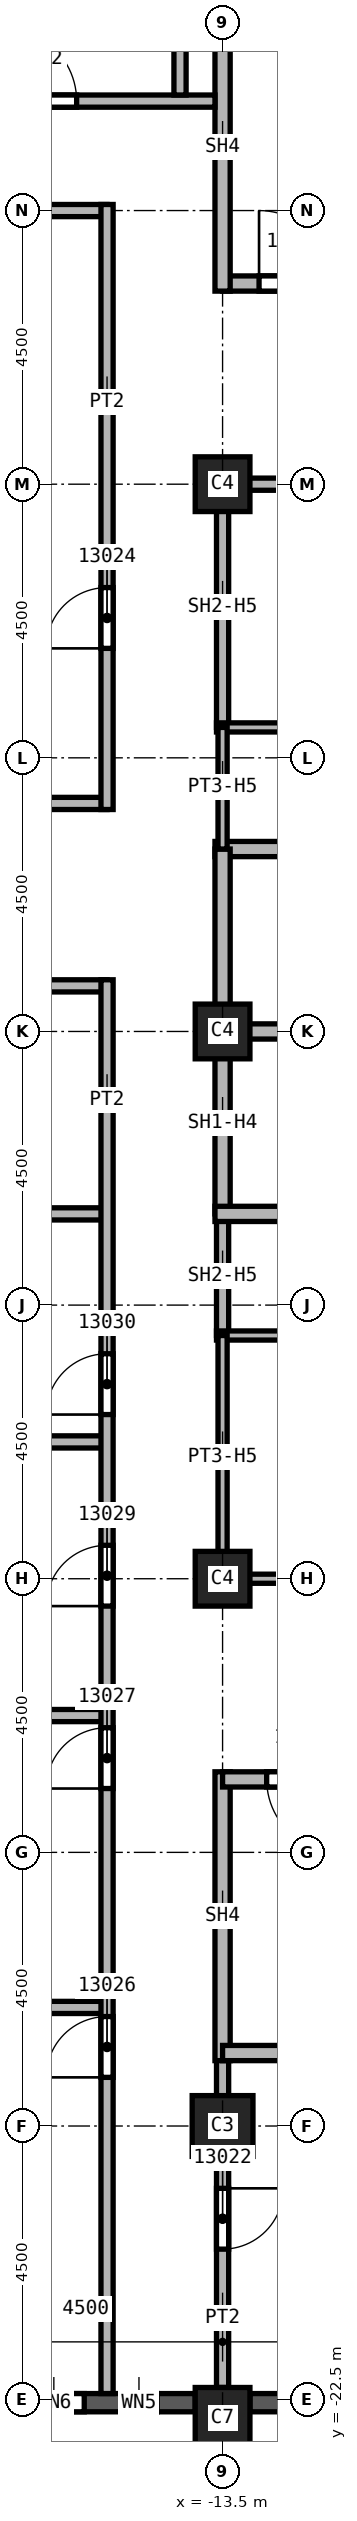
"""IFC4 building model, lengths in metres.
Left out: names, types, materials, properties, quantities, classifications, styles, units other than length and angle.
Written with IfcOpenShell. Run it as: python <this file> out.ifc"""

import sys

from ifc_helpers import new_model, si_unit, direction, frame, frame_2d, origin, origin_2d, place, context, subcontext, project, spatial, rectangle, extrude, element, fill, save


model = new_model("IFC4")
c1 = context("Model", 3, precision=1e-05, world=origin(), true_north=direction((0.0, 1.0)))
c2 = subcontext(c1, "Body", "Model", "MODEL_VIEW")
j1 = project(units=[si_unit("LENGTHUNIT", "METRE"), si_unit("PLANEANGLEUNIT", "RADIAN")], contexts=[c1])
p1 = place(None, origin())
s1 = spatial("IfcSite", under=j1, at=p1, CompositionType="ELEMENT")
p2 = place(p1, origin())
s2 = spatial("IfcBuilding", under=s1, at=p2, CompositionType="ELEMENT")
p3 = place(p2, frame((0.0, 0.0, 208.0)))
s3 = spatial("IfcBuildingStorey", under=s2, at=p3, CompositionType="ELEMENT", Elevation=208.0)
p4 = place(p3, frame((-13.5, -18.0, 0.0), z_axis=(0.0, 0.0, 1.0), x_axis=(1.0, 0.0, 0.0)))
e1 = element("IfcColumn", 1, at=p4, inside=s3, PredefinedType="COLUMN", context=c2, shape_type="SweptSolid", body=[
    extrude(rectangle(XDim=1.0, YDim=1.0, at=origin_2d()), origin(), (0.0, 0.0, 1.0), 3.72),
])
for number, where, z_axis, x_axis in (
    (2, (-13.5, 0.0, 0.0), (0.0, 0.0, 1.0), (1.0, 0.0, 0.0)),
    (3, (-13.5, 9.0, 0.0), (0.0, 0.0, 1.0), (1.0, 0.0, 0.0)),
    (4, (-13.5, -9.0, 0.0), (0.0, 0.0, 1.0), (1.0, 0.0, 0.0)),
):
    element("IfcColumn", number, at=place(p3, frame(where, z_axis=z_axis, x_axis=x_axis)), inside=s3, PredefinedType="COLUMN", context=c2, shape_type="SweptSolid", body=[
        extrude(rectangle(XDim=0.9, YDim=0.9, at=origin_2d()), origin(), (0.0, 0.0, 1.0), 3.72),
    ])
p5 = place(p3, frame((-13.5, -22.8, 0.0), z_axis=(0.0, 0.0, 1.0), x_axis=(1.0, 0.0, 0.0)))
e5 = element("IfcColumn", 5, at=p5, inside=s3, PredefinedType="COLUMN", context=c2, shape_type="SweptSolid", body=[
    extrude(rectangle(XDim=0.9, YDim=1.0, at=origin_2d()), origin(), (0.0, 0.0, 1.0), 3.72),
])
p6 = place(p3, frame((-17.55, -22.55, 0.0), z_axis=(0.0, 0.0, 1.0), x_axis=(1.0, 0.0, 0.0)))
e6 = element("IfcWall", 6, at=p6, inside=s3, PredefinedType="SOLIDWALL", context=c2, shape_type="SweptSolid", body=[
    extrude(rectangle(XDim=3.6, YDim=0.3, at=frame_2d((1.8, 0.0))), origin(), (0.0, 0.0, 1.0), 3.12),
])
p7 = place(p6, frame((0.775, 0.0, 0.8)))
e7 = element("IfcOpeningElement", 7, at=p7, cuts=e6, PredefinedType="OPENING", context=c2, shape_type="SweptSolid", body=[
    extrude(rectangle(XDim=1.0, YDim=1.95, at=frame_2d((0.5, 0.975))), frame((0.0, 0.15, 0.0), z_axis=(0.0, -1.0, 0.0), x_axis=(1.0, 0.0, 0.0)), (0.0, 0.0, 1.0), 0.3),
])
p8 = place(p6, frame((2.375, 0.0, 0.8)))
e8 = element("IfcOpeningElement", 8, at=p8, cuts=e6, PredefinedType="OPENING", context=c2, shape_type="SweptSolid", body=[
    extrude(rectangle(XDim=0.6, YDim=1.95, at=frame_2d((0.3, 0.975))), frame((0.0, 0.15, 0.0), z_axis=(0.0, -1.0, 0.0), x_axis=(1.0, 0.0, 0.0)), (0.0, 0.0, 1.0), 0.3),
])
p9 = place(p3, frame((-13.05, -22.55, 0.0), z_axis=(0.0, 0.0, 1.0), x_axis=(1.0, 0.0, 0.0)))
e9 = element("IfcWall", 9, at=p9, inside=s3, PredefinedType="SOLIDWALL", context=c2, shape_type="SweptSolid", body=[
    extrude(rectangle(XDim=3.6, YDim=0.3, at=frame_2d((1.8, 0.0))), origin(), (0.0, 0.0, 1.0), 3.12),
])
p10 = place(p9, frame((0.6, 0.0, 0.8)))
e10 = element("IfcOpeningElement", 10, at=p10, cuts=e9, PredefinedType="OPENING", context=c2, shape_type="SweptSolid", body=[
    extrude(rectangle(XDim=2.4, YDim=1.95, at=frame_2d((1.2, 0.975))), frame((0.0, 0.15, 0.0), z_axis=(0.0, -1.0, 0.0), x_axis=(1.0, 0.0, 0.0)), (0.0, 0.0, 1.0), 0.3),
])
p11 = place(p3, frame((-33.85, 3.75, 0.0), z_axis=(0.0, 0.0, 1.0), x_axis=(1.0, 0.0, 0.0)))
e11 = element("IfcWall", 11, at=p11, inside=s3, PredefinedType="PARTITIONING", context=c2, shape_type="SweptSolid", body=[
    extrude(rectangle(XDim=18.45, YDim=0.2, at=frame_2d((9.225, 0.0))), origin(), (0.0, 0.0, 1.0), 3.72),
])
for number, where, z_axis, x_axis in (
    (12, (-27.1, -11.25, 0.0), (0.0, 0.0, 1.0), (1.0, 0.0, 0.0)),
    (13, (-27.1, -6.75, 0.0), (0.0, 0.0, 1.0), (1.0, 0.0, 0.0)),
    (14, (-27.1, -3.0, 0.0), (0.0, 0.0, 1.0), (1.0, 0.0, 0.0)),
):
    element("IfcWall", number, at=place(p3, frame(where, z_axis=z_axis, x_axis=x_axis)), inside=s3, PredefinedType="PARTITIONING", context=c2, shape_type="SweptSolid", body=[
        extrude(rectangle(XDim=11.7, YDim=0.2, at=frame_2d((5.85, 0.0))), origin(), (0.0, 0.0, 1.0), 3.72),
    ])
p12 = place(p3, frame((-15.4, 0.75, 0.0), z_axis=(0.0, 0.0, 1.0), x_axis=(-1.0, 0.0, 0.0)))
e15 = element("IfcWall", 15, at=p12, inside=s3, PredefinedType="PARTITIONING", context=c2, shape_type="SweptSolid", body=[
    extrude(rectangle(XDim=18.45, YDim=0.2, at=frame_2d((9.225, 0.0))), origin(), (0.0, 0.0, 1.0), 3.72),
])
p13 = place(p12, frame((3.55, 0.0, 0.0)))
e16 = element("IfcOpeningElement", 16, at=p13, cuts=e15, PredefinedType="OPENING", context=c2, shape_type="SweptSolid", body=[
    extrude(rectangle(XDim=1.0, YDim=2.1, at=frame_2d((0.5, 1.05))), frame((0.0, 0.1, 0.0), z_axis=(0.0, -1.0, 0.0), x_axis=(1.0, 0.0, 0.0)), (0.0, 0.0, 1.0), 0.2),
])
p14 = place(p3, frame((-15.4, 13.5, 0.0), z_axis=(0.0, 0.0, 1.0), x_axis=(-1.0, 0.0, 0.0)))
e17 = element("IfcWall", 17, at=p14, inside=s3, PredefinedType="PARTITIONING", context=c2, shape_type="SweptSolid", body=[
    extrude(rectangle(XDim=6.6, YDim=0.2, at=frame_2d((3.3, 0.0))), origin(), (0.0, 0.0, 1.0), 3.72),
])
p15 = place(p3, frame((-20.0, -16.05, 0.0), z_axis=(0.0, 0.0, 1.0), x_axis=(1.0, 0.0, 0.0)))
e18 = element("IfcWall", 18, at=p15, inside=s3, PredefinedType="PARTITIONING", context=c2, shape_type="SweptSolid", body=[
    extrude(rectangle(XDim=4.6, YDim=0.2, at=frame_2d((2.3, 0.0))), origin(), (0.0, 0.0, 1.0), 3.72),
])
p16 = place(p3, frame((-15.4, -22.4, 0.0), z_axis=(0.0, 0.0, 1.0), x_axis=(0.0, 1.0, 0.0)))
e19 = element("IfcWall", 19, at=p16, inside=s3, PredefinedType="PARTITIONING", context=c2, shape_type="SweptSolid", body=[
    extrude(rectangle(XDim=23.25, YDim=0.2, at=frame_2d((11.625, 0.0))), origin(), (0.0, 0.0, 1.0), 3.72),
])
p17 = place(p16, frame((5.2, 0.0, 0.0)))
e20 = element("IfcOpeningElement", 20, at=p17, cuts=e19, PredefinedType="OPENING", context=c2, shape_type="SweptSolid", body=[
    extrude(rectangle(XDim=1.0, YDim=2.1, at=frame_2d((0.5, 1.05))), frame((0.0, 0.1, 0.0), z_axis=(0.0, -1.0, 0.0), x_axis=(1.0, 0.0, 0.0)), (0.0, 0.0, 1.0), 0.2),
])
p18 = place(p16, frame((9.95, 0.0, 0.0)))
e21 = element("IfcOpeningElement", 21, at=p18, cuts=e19, PredefinedType="OPENING", context=c2, shape_type="SweptSolid", body=[
    extrude(rectangle(XDim=1.0, YDim=2.1, at=frame_2d((0.5, 1.05))), frame((0.0, 0.1, 0.0), z_axis=(0.0, -1.0, 0.0), x_axis=(1.0, 0.0, 0.0)), (0.0, 0.0, 1.0), 0.2),
])
p19 = place(p16, frame((12.95, 0.0, 0.0)))
e22 = element("IfcOpeningElement", 22, at=p19, cuts=e19, PredefinedType="OPENING", context=c2, shape_type="SweptSolid", body=[
    extrude(rectangle(XDim=1.0, YDim=2.1, at=frame_2d((0.5, 1.05))), frame((0.0, 0.1, 0.0), z_axis=(0.0, -1.0, 0.0), x_axis=(1.0, 0.0, 0.0)), (0.0, 0.0, 1.0), 0.2),
])
p20 = place(p16, frame((16.1, 0.0, 0.0)))
e23 = element("IfcOpeningElement", 23, at=p20, cuts=e19, PredefinedType="OPENING", context=c2, shape_type="SweptSolid", body=[
    extrude(rectangle(XDim=1.0, YDim=2.1, at=frame_2d((0.5, 1.05))), frame((0.0, 0.1, 0.0), z_axis=(0.0, -1.0, 0.0), x_axis=(1.0, 0.0, 0.0)), (0.0, 0.0, 1.0), 0.2),
])
p21 = place(p3, frame((-15.4, 3.65, 0.0), z_axis=(0.0, 0.0, 1.0), x_axis=(0.0, 1.0, 0.0)))
e24 = element("IfcWall", 24, at=p21, inside=s3, PredefinedType="PARTITIONING", context=c2, shape_type="SweptSolid", body=[
    extrude(rectangle(XDim=9.95, YDim=0.2, at=frame_2d((4.975, 0.0))), origin(), (0.0, 0.0, 1.0), 3.72),
])
p22 = place(p21, frame((2.65, 0.0, 0.0)))
e25 = element("IfcOpeningElement", 25, at=p22, cuts=e24, PredefinedType="OPENING", context=c2, shape_type="SweptSolid", body=[
    extrude(rectangle(XDim=1.0, YDim=2.1, at=frame_2d((0.5, 1.05))), frame((0.0, 0.1, 0.0), z_axis=(0.0, -1.0, 0.0), x_axis=(1.0, 0.0, 0.0)), (0.0, 0.0, 1.0), 0.2),
])
p23 = place(p3, frame((-13.5, -16.675, 0.0), z_axis=(0.0, 0.0, 1.0), x_axis=(0.0, -1.0, 0.0)))
e26 = element("IfcWall", 26, at=p23, inside=s3, PredefinedType="PARTITIONING", context=c2, shape_type="SweptSolid", body=[
    extrude(rectangle(XDim=5.625, YDim=0.2, at=frame_2d((2.812, 0.0))), origin(), (0.0, 0.0, 1.0), 3.72),
])
p24 = place(p23, frame((2.35, 0.0, 0.0)))
e27 = element("IfcOpeningElement", 27, at=p24, cuts=e26, PredefinedType="OPENING", context=c2, shape_type="SweptSolid", body=[
    extrude(rectangle(XDim=1.0, YDim=2.1, at=frame_2d((0.5, 1.05))), frame((0.0, 0.1, 0.0), z_axis=(0.0, -1.0, 0.0), x_axis=(1.0, 0.0, 0.0)), (0.0, 0.0, 1.0), 0.2),
])
p25 = place(p3, frame((-13.5, -5.0, 0.0), z_axis=(0.0, 0.0, 1.0), x_axis=(0.0, 1.0, 0.0)))
e28 = element("IfcWall", 28, at=p25, inside=s3, PredefinedType="SOLIDWALL", context=c2, shape_type="SweptSolid", body=[
    extrude(rectangle(XDim=2.0, YDim=0.2, at=frame_2d((1.0, 0.0))), origin(), (0.0, 0.0, 1.0), 2.958),
])
p26 = place(p3, frame((-13.5, 5.0, 0.0), z_axis=(0.0, 0.0, 1.0), x_axis=(0.0, 1.0, 0.0)))
e29 = element("IfcWall", 29, at=p26, inside=s3, PredefinedType="SOLIDWALL", context=c2, shape_type="SweptSolid", body=[
    extrude(rectangle(XDim=4.1, YDim=0.2, at=frame_2d((2.05, 0.0))), origin(), (0.0, 0.0, 1.0), 2.958),
])
p27 = place(p3, frame((-13.5, 9.0, 0.0), z_axis=(0.0, 0.0, 1.0), x_axis=(1.0, 0.0, 0.0)))
e30 = element("IfcWall", 30, at=p27, inside=s3, PredefinedType="SOLIDWALL", context=c2, shape_type="SweptSolid", body=[
    extrude(rectangle(XDim=3.0, YDim=0.2, at=frame_2d((1.5, 0.0))), origin(), (0.0, 0.0, 1.0), 2.958),
])
p28 = place(p3, frame((-13.625, 0.0, 0.0), z_axis=(0.0, 0.0, 1.0), x_axis=(1.0, 0.0, 0.0)))
e31 = element("IfcWall", 31, at=p28, inside=s3, PredefinedType="SOLIDWALL", context=c2, shape_type="SweptSolid", body=[
    extrude(rectangle(XDim=3.125, YDim=0.25, at=frame_2d((1.562, 0.0))), origin(), (0.0, 0.0, 1.0), 3.72),
])
p29 = place(p3, frame((-13.625, 3.0, 0.0), z_axis=(0.0, 0.0, 1.0), x_axis=(1.0, 0.0, 0.0)))
e32 = element("IfcWall", 32, at=p29, inside=s3, PredefinedType="SOLIDWALL", context=c2, shape_type="SweptSolid", body=[
    extrude(rectangle(XDim=9.25, YDim=0.25, at=frame_2d((4.625, 0.0))), origin(), (0.0, 0.0, 1.0), 3.72),
])
p30 = place(p29, frame((3.25, 0.0, 0.0)))
e33 = element("IfcOpeningElement", 33, at=p30, cuts=e32, PredefinedType="OPENING", context=c2, shape_type="SweptSolid", body=[
    extrude(rectangle(XDim=1.1, YDim=2.1, at=frame_2d((0.55, 1.05))), frame((0.0, 0.125, 0.0), z_axis=(0.0, -1.0, 0.0), x_axis=(1.0, 0.0, 0.0)), (0.0, 0.0, 1.0), 0.25),
])
p31 = place(p3, frame((-13.5, -3.0, 0.0), z_axis=(0.0, 0.0, 1.0), x_axis=(0.0, 1.0, 0.0)))
e34 = element("IfcWall", 34, at=p31, inside=s3, PredefinedType="SOLIDWALL", context=c2, shape_type="SweptSolid", body=[
    extrude(rectangle(XDim=6.0, YDim=0.25, at=frame_2d((3.0, 0.0))), origin(), (0.0, 0.0, 1.0), 2.958),
])
p32 = place(p3, frame((-13.625, -3.0, 0.0), z_axis=(0.0, 0.0, 1.0), x_axis=(1.0, 0.0, 0.0)))
e35 = element("IfcWall", 35, at=p32, inside=s3, PredefinedType="SOLIDWALL", context=c2, shape_type="SweptSolid", body=[
    extrude(rectangle(XDim=6.125, YDim=0.25, at=frame_2d((3.062, 0.0))), origin(), (0.0, 0.0, 1.0), 3.72),
])
p33 = place(p32, frame((3.25, 0.0, 0.0)))
e36 = element("IfcOpeningElement", 36, at=p33, cuts=e35, PredefinedType="OPENING", context=c2, shape_type="SweptSolid", body=[
    extrude(rectangle(XDim=1.1, YDim=2.1, at=frame_2d((0.55, 1.05))), frame((0.0, 0.125, 0.0), z_axis=(0.0, -1.0, 0.0), x_axis=(1.0, 0.0, 0.0)), (0.0, 0.0, 1.0), 0.25),
])
p34 = place(p3, frame((-13.5, -12.175, 0.0), z_axis=(0.0, 0.0, 1.0), x_axis=(0.0, -1.0, 0.0)))
e37 = element("IfcWall", 37, at=p34, inside=s3, PredefinedType="SOLIDWALL", context=c2, shape_type="SweptSolid", body=[
    extrude(rectangle(XDim=4.75, YDim=0.25, at=frame_2d((2.375, 0.0))), origin(), (0.0, 0.0, 1.0), 3.72),
])
p35 = place(p3, frame((-13.5, 12.3, 0.0), z_axis=(0.0, 0.0, 1.0), x_axis=(1.0, 0.0, 0.0)))
e38 = element("IfcWall", 38, at=p35, inside=s3, PredefinedType="SOLIDWALL", context=c2, shape_type="SweptSolid", body=[
    extrude(rectangle(XDim=9.125, YDim=0.25, at=frame_2d((4.562, 0.0))), origin(), (0.0, 0.0, 1.0), 3.72),
])
p36 = place(p35, frame((0.6, 0.0, 0.0)))
e39 = element("IfcOpeningElement", 39, at=p36, cuts=e38, PredefinedType="OPENING", context=c2, shape_type="SweptSolid", body=[
    extrude(rectangle(XDim=1.2, YDim=2.1, at=frame_2d((0.6, 1.05))), frame((0.0, 0.125, 0.0), z_axis=(0.0, -1.0, 0.0), x_axis=(1.0, 0.0, 0.0)), (0.0, 0.0, 1.0), 0.25),
])
p37 = place(p3, frame((-13.5, 16.78, 0.0), z_axis=(0.0, 0.0, 1.0), x_axis=(0.0, -1.0, 0.0)))
e40 = element("IfcWall", 40, at=p37, inside=s3, PredefinedType="SOLIDWALL", context=c2, shape_type="SweptSolid", body=[
    extrude(rectangle(XDim=4.605, YDim=0.25, at=frame_2d((2.302, 0.0))), origin(), (0.0, 0.0, 1.0), 3.72),
])
p38 = place(p3, frame((-4.5, -16.8, 0.0), z_axis=(0.0, 0.0, 1.0), x_axis=(-1.0, 0.0, 0.0)))
e41 = element("IfcWall", 41, at=p38, inside=s3, PredefinedType="SOLIDWALL", context=c2, shape_type="SweptSolid", body=[
    extrude(rectangle(XDim=9.0, YDim=0.25, at=frame_2d((4.5, 0.0))), origin(), (0.0, 0.0, 1.0), 3.72),
])
p39 = place(p3, frame((-4.375, -12.3, 0.0), z_axis=(0.0, 0.0, 1.0), x_axis=(-1.0, 0.0, 0.0)))
e42 = element("IfcWall", 42, at=p39, inside=s3, PredefinedType="SOLIDWALL", context=c2, shape_type="SweptSolid", body=[
    extrude(rectangle(XDim=9.125, YDim=0.25, at=frame_2d((4.562, 0.0))), origin(), (0.0, 0.0, 1.0), 3.72),
])
p40 = place(p39, frame((7.2, 0.0, 0.0)))
e43 = element("IfcOpeningElement", 43, at=p40, cuts=e42, PredefinedType="OPENING", context=c2, shape_type="SweptSolid", body=[
    extrude(rectangle(XDim=1.2, YDim=2.1, at=frame_2d((0.6, 1.05))), frame((0.0, 0.125, 0.0), z_axis=(0.0, -1.0, 0.0), x_axis=(1.0, 0.0, 0.0)), (0.0, 0.0, 1.0), 0.25),
])
for number, where, z_axis, x_axis in (
    (44, (-13.6, -5.0, 0.0), (0.0, 0.0, 1.0), (1.0, 0.0, 0.0)),
    (45, (-13.6, 5.0, 0.0), (0.0, 0.0, 1.0), (1.0, 0.0, 0.0)),
):
    element("IfcWall", number, at=place(p3, frame(where, z_axis=z_axis, x_axis=x_axis)), inside=s3, PredefinedType="PARTITIONING", context=c2, shape_type="SweptSolid", body=[
        extrude(rectangle(XDim=3.1, YDim=0.15, at=frame_2d((1.55, 0.0))), origin(), (0.0, 0.0, 1.0), 3.72),
    ])
p41 = place(p3, frame((-13.5, -9.075, 0.0), z_axis=(0.0, 0.0, 1.0), x_axis=(0.0, 1.0, 0.0)))
e46 = element("IfcWall", 46, at=p41, inside=s3, PredefinedType="PARTITIONING", context=c2, shape_type="SweptSolid", body=[
    extrude(rectangle(XDim=4.075, YDim=0.15, at=frame_2d((2.038, 0.0))), origin(), (0.0, 0.0, 1.0), 2.958),
])
p42 = place(p3, frame((-13.5, 3.0, 0.0), z_axis=(0.0, 0.0, 1.0), x_axis=(0.0, 1.0, 0.0)))
e47 = element("IfcWall", 47, at=p42, inside=s3, PredefinedType="PARTITIONING", context=c2, shape_type="SweptSolid", body=[
    extrude(rectangle(XDim=2.0, YDim=0.15, at=frame_2d((1.0, 0.0))), origin(), (0.0, 0.0, 1.0), 2.958),
])
p43 = place(p3, frame((-10.5, -9.0, 0.0), z_axis=(0.0, 0.0, 1.0), x_axis=(-1.0, 0.0, 0.0)))
e48 = element("IfcWall", 48, at=p43, inside=s3, PredefinedType="PARTITIONING", context=c2, shape_type="SweptSolid", body=[
    extrude(rectangle(XDim=3.0, YDim=0.15, at=frame_2d((1.5, 0.0))), origin(), (0.0, 0.0, 1.0), 2.958),
])
p44 = place(p3, frame((-21.9, 15.3, 0.0), z_axis=(0.0, 0.0, 1.0), x_axis=(1.0, 0.0, 0.0)))
e49 = element("IfcWall", 49, at=p44, inside=s3, PredefinedType="SOLIDWALL", context=c2, shape_type="SweptSolid", body=[
    extrude(rectangle(XDim=8.275, YDim=0.2, at=frame_2d((4.137, 0.0))), origin(), (0.0, 0.0, 1.0), 3.72),
])
p45 = place(p44, frame((4.8, 0.0, 0.0)))
e50 = element("IfcOpeningElement", 50, at=p45, cuts=e49, PredefinedType="OPENING", context=c2, shape_type="SweptSolid", body=[
    extrude(rectangle(XDim=1.2, YDim=2.1, at=frame_2d((0.6, 1.05))), frame((0.0, 0.1, 0.0), z_axis=(0.0, -1.0, 0.0), x_axis=(1.0, 0.0, 0.0)), (0.0, 0.0, 1.0), 0.2),
])
p46 = place(p3, frame((-14.2, 15.4, 0.0), z_axis=(0.0, 0.0, 1.0), x_axis=(0.0, 1.0, 0.0)))
e51 = element("IfcWall", 51, at=p46, inside=s3, PredefinedType="SOLIDWALL", context=c2, shape_type="SweptSolid", body=[
    extrude(rectangle(XDim=5.9, YDim=0.2, at=frame_2d((2.95, 0.0))), origin(), (0.0, 0.0, 1.0), 3.72),
])
p47 = place(p36, origin())
e52 = element("IfcDoor", 52, at=p47, inside=s3, OperationType="SINGLE_SWING_RIGHT", PredefinedType="DOOR", context=c2, shape_type="SweptSolid", body=[
    extrude(rectangle(XDim=1.2, YDim=2.1, at=frame_2d((0.6, 1.05))), frame((0.0, 0.025, 0.0), z_axis=(0.0, -1.0, 0.0), x_axis=(1.0, 0.0, 0.0)), (0.0, 0.0, 1.0), 0.05),
])
fill(e39, e52)
p48 = place(p40, origin())
e53 = element("IfcDoor", 53, at=p48, inside=s3, OperationType="SINGLE_SWING_LEFT", PredefinedType="DOOR", context=c2, shape_type="SweptSolid", body=[
    extrude(rectangle(XDim=1.2, YDim=2.1, at=frame_2d((0.6, 1.05))), frame((0.0, 0.025, 0.0), z_axis=(0.0, -1.0, 0.0), x_axis=(1.0, 0.0, 0.0)), (0.0, 0.0, 1.0), 0.05),
])
fill(e43, e53)
p49 = place(p24, origin())
e54 = element("IfcDoor", 54, at=p49, inside=s3, OperationType="SINGLE_SWING_LEFT", PredefinedType="DOOR", context=c2, shape_type="SweptSolid", body=[
    extrude(rectangle(XDim=1.0, YDim=2.1, at=frame_2d((0.5, 1.05))), frame((0.0, 0.025, 0.0), z_axis=(0.0, -1.0, 0.0), x_axis=(1.0, 0.0, 0.0)), (0.0, 0.0, 1.0), 0.05),
])
fill(e27, e54)
p50 = place(p22, origin())
e55 = element("IfcDoor", 55, at=p50, inside=s3, OperationType="SINGLE_SWING_LEFT", PredefinedType="DOOR", context=c2, shape_type="SweptSolid", body=[
    extrude(rectangle(XDim=1.0, YDim=2.1, at=frame_2d((0.5, 1.05))), frame((0.0, 0.025, 0.0), z_axis=(0.0, -1.0, 0.0), x_axis=(1.0, 0.0, 0.0)), (0.0, 0.0, 1.0), 0.05),
])
fill(e25, e55)
p51 = place(p17, origin())
e56 = element("IfcDoor", 56, at=p51, inside=s3, OperationType="SINGLE_SWING_LEFT", PredefinedType="DOOR", context=c2, shape_type="SweptSolid", body=[
    extrude(rectangle(XDim=1.0, YDim=2.1, at=frame_2d((0.5, 1.05))), frame((0.0, 0.025, 0.0), z_axis=(0.0, -1.0, 0.0), x_axis=(1.0, 0.0, 0.0)), (0.0, 0.0, 1.0), 0.05),
])
fill(e20, e56)
p52 = place(p18, origin())
e57 = element("IfcDoor", 57, at=p52, inside=s3, OperationType="SINGLE_SWING_RIGHT", PredefinedType="DOOR", context=c2, shape_type="SweptSolid", body=[
    extrude(rectangle(XDim=1.0, YDim=2.1, at=frame_2d((0.5, 1.05))), frame((0.0, 0.025, 0.0), z_axis=(0.0, -1.0, 0.0), x_axis=(1.0, 0.0, 0.0)), (0.0, 0.0, 1.0), 0.05),
])
fill(e21, e57)
p53 = place(p19, origin())
e58 = element("IfcDoor", 58, at=p53, inside=s3, OperationType="SINGLE_SWING_RIGHT", PredefinedType="DOOR", context=c2, shape_type="SweptSolid", body=[
    extrude(rectangle(XDim=1.0, YDim=2.1, at=frame_2d((0.5, 1.05))), frame((0.0, 0.025, 0.0), z_axis=(0.0, -1.0, 0.0), x_axis=(1.0, 0.0, 0.0)), (0.0, 0.0, 1.0), 0.05),
])
fill(e22, e58)
p54 = place(p20, origin())
e59 = element("IfcDoor", 59, at=p54, inside=s3, OperationType="SINGLE_SWING_LEFT", PredefinedType="DOOR", context=c2, shape_type="SweptSolid", body=[
    extrude(rectangle(XDim=1.0, YDim=2.1, at=frame_2d((0.5, 1.05))), frame((0.0, 0.025, 0.0), z_axis=(0.0, -1.0, 0.0), x_axis=(1.0, 0.0, 0.0)), (0.0, 0.0, 1.0), 0.05),
])
fill(e23, e59)
p55 = place(p45, origin())
e60 = element("IfcDoor", 60, at=p55, inside=s3, OperationType="SINGLE_SWING_RIGHT", PredefinedType="DOOR", context=c2, shape_type="SweptSolid", body=[
    extrude(rectangle(XDim=1.2, YDim=2.1, at=frame_2d((0.6, 1.05))), frame((0.0, 0.025, 0.0), z_axis=(0.0, -1.0, 0.0), x_axis=(1.0, 0.0, 0.0)), (0.0, 0.0, 1.0), 0.05),
])
fill(e50, e60)
p56 = place(p7, origin())
e61 = element("IfcWindow", 61, at=p56, inside=s3, PartitioningType="SINGLE_PANEL", PredefinedType="WINDOW", context=c2, shape_type="SweptSolid", body=[
    extrude(rectangle(XDim=1.0, YDim=1.95, at=frame_2d((0.5, 0.975))), frame((0.0, 0.03, 0.0), z_axis=(0.0, -1.0, 0.0), x_axis=(1.0, 0.0, 0.0)), (0.0, 0.0, 1.0), 0.06),
])
fill(e7, e61)
p57 = place(p8, origin())
e62 = element("IfcWindow", 62, at=p57, inside=s3, PartitioningType="SINGLE_PANEL", PredefinedType="WINDOW", context=c2, shape_type="SweptSolid", body=[
    extrude(rectangle(XDim=0.6, YDim=1.95, at=frame_2d((0.3, 0.975))), frame((0.0, 0.03, 0.0), z_axis=(0.0, -1.0, 0.0), x_axis=(1.0, 0.0, 0.0)), (0.0, 0.0, 1.0), 0.06),
])
fill(e8, e62)
save(model, sys.argv[1])
